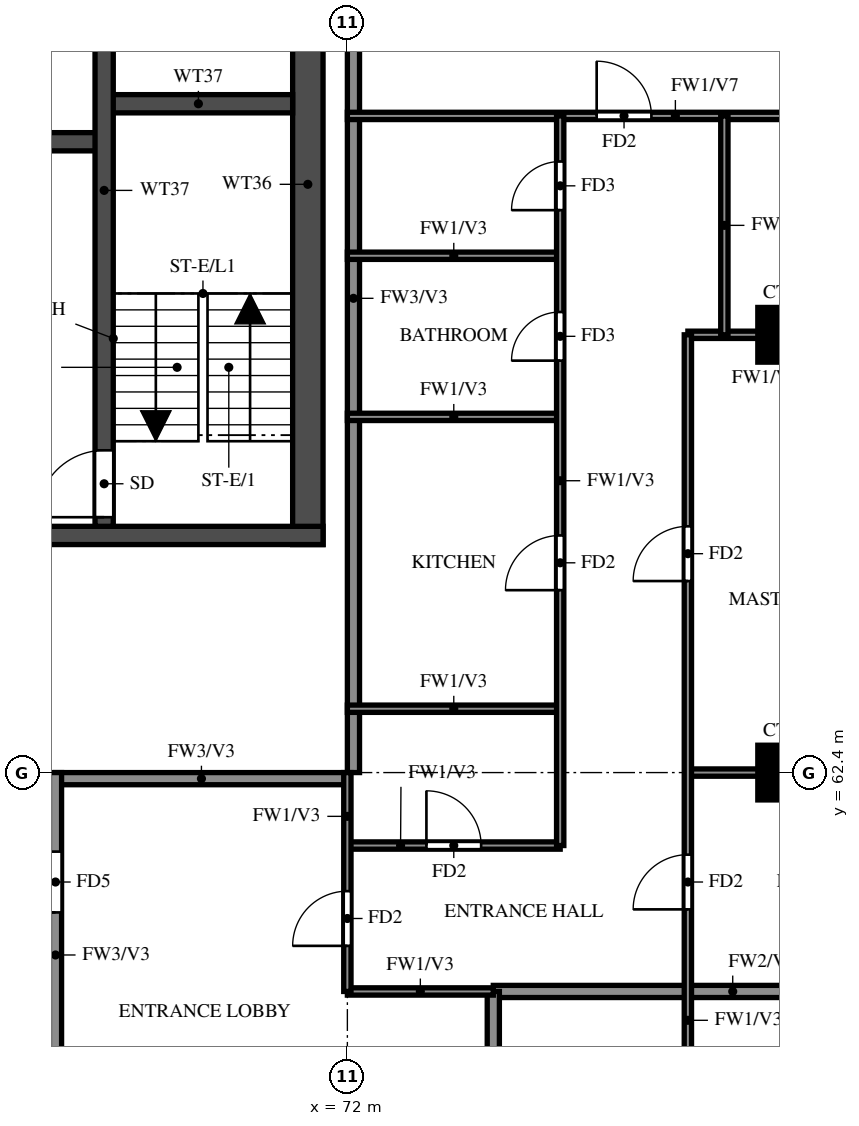
"""IFC4 building model, lengths in metres.
Left out: names, types, materials, properties, quantities, classifications, styles, units other than length and angle.
Written with IfcOpenShell. Run it as: python <this file> out.ifc"""

import sys

from ifc_helpers import new_model, si_unit, direction, frame, frame_2d, origin, origin_2d, place, context, subcontext, project, spatial, rectangle, extrude, source, transform, mapped, element, fill, save


model = new_model("IFC4")
c1 = context("Model", 3, precision=1e-05, world=origin(), true_north=direction((0.0, 1.0)))
c2 = subcontext(c1, "Body", "Model", "MODEL_VIEW")
j1 = project(units=[si_unit("LENGTHUNIT", "METRE"), si_unit("PLANEANGLEUNIT", "RADIAN")], contexts=[c1])
p1 = place(None, origin())
s1 = spatial("IfcSite", under=j1, at=p1, CompositionType="ELEMENT")
p2 = place(p1, origin())
s2 = spatial("IfcBuilding", under=s1, at=p2, CompositionType="ELEMENT")
p3 = place(p2, frame((0.0, 0.0, 218.5)))
s3 = spatial("IfcBuildingStorey", under=s2, at=p3, CompositionType="ELEMENT", Elevation=218.5)
m1 = source(origin(), c2, "Body", "SweptSolid", [
    extrude(rectangle(XDim=0.9, YDim=0.9, at=origin_2d()), origin(), (0.0, 0.0, 1.0), 3.22),
])
for number, where, z_axis, x_axis in (
    (1, (79.2, 62.4, 0.0), (0.0, 0.0, 1.0), (1.0, 0.0, 0.0)),
    (2, (79.2, 69.6, 0.0), (0.0, 0.0, 1.0), (1.0, 0.0, 0.0)),
):
    element("IfcColumn", number, at=place(p3, frame(where, z_axis=z_axis, x_axis=x_axis)), inside=s3, PredefinedType="COLUMN", context=c2, shape_type="MappedRepresentation", body=[
        mapped(m1, transform((0.0, 0.0, 0.0))),
    ])
p4 = place(p3, frame((71.35, 66.15, 0.0), z_axis=(0.0, 0.0, 1.0), x_axis=(0.0, 1.0, 0.0)))
e3 = element("IfcWall", 3, at=p4, inside=s3, PredefinedType="SHEAR", context=c2, shape_type="SweptSolid", body=[
    extrude(rectangle(XDim=11.85, YDim=0.5, at=frame_2d((5.925, 0.0))), origin(), (0.0, 0.0, 1.0), 3.22),
])
p5 = place(p3, frame((29.2, 66.3, 0.0), z_axis=(0.0, 0.0, 1.0), x_axis=(1.0, 0.0, 0.0)))
e4 = element("IfcWall", 4, at=p5, inside=s3, PredefinedType="SHEAR", context=c2, shape_type="SweptSolid", body=[
    extrude(rectangle(XDim=42.4, YDim=0.3, at=frame_2d((21.2, 0.0))), origin(), (0.0, 0.0, 1.0), 3.22),
])
p6 = place(p5, frame((1.425, 0.0, 0.0)))
e5 = element("IfcOpeningElement", 5, at=p6, cuts=e4, PredefinedType="OPENING", context=c2, shape_type="SweptSolid", body=[
    extrude(rectangle(XDim=1.1, YDim=2.1, at=frame_2d((0.55, 1.05))), frame((0.0, 0.16, 0.0), z_axis=(0.0, -1.0, 0.0), x_axis=(1.0, 0.0, 0.0)), (0.0, 0.0, 1.0), 0.32),
])
p7 = place(p5, frame((4.2, 0.0, 0.0)))
e6 = element("IfcOpeningElement", 6, at=p7, cuts=e4, PredefinedType="OPENING", context=c2, shape_type="SweptSolid", body=[
    extrude(rectangle(XDim=1.8, YDim=2.1, at=frame_2d((0.9, 1.05))), frame((0.0, 0.16, 0.0), z_axis=(0.0, -1.0, 0.0), x_axis=(1.0, 0.0, 0.0)), (0.0, 0.0, 1.0), 0.32),
])
p8 = place(p3, frame((32.8, 72.775, 0.0), z_axis=(0.0, 0.0, 1.0), x_axis=(1.0, 0.0, 0.0)))
e7 = element("IfcWall", 7, at=p8, inside=s3, PredefinedType="SHEAR", context=c2, shape_type="SweptSolid", body=[
    extrude(rectangle(XDim=35.2, YDim=0.3, at=frame_2d((17.6, 0.0))), origin(), (0.0, 0.0, 1.0), 3.22),
])
p9 = place(p8, frame((19.8, 0.0, 0.0)))
e8 = element("IfcOpeningElement", 8, at=p9, cuts=e7, PredefinedType="OPENING", context=c2, shape_type="SweptSolid", body=[
    extrude(rectangle(XDim=1.1, YDim=2.1, at=frame_2d((0.55, 1.05))), frame((0.0, 0.16, 0.0), z_axis=(0.0, -1.0, 0.0), x_axis=(1.0, 0.0, 0.0)), (0.0, 0.0, 1.0), 0.32),
])
p10 = place(p8, frame((27.725, 0.0, 0.0)))
e9 = element("IfcOpeningElement", 9, at=p10, cuts=e7, PredefinedType="OPENING", context=c2, shape_type="SweptSolid", body=[
    extrude(rectangle(XDim=1.1, YDim=2.1, at=frame_2d((0.55, 1.05))), frame((0.0, 0.16, 0.0), z_axis=(0.0, -1.0, 0.0), x_axis=(1.0, 0.0, 0.0)), (0.0, 0.0, 1.0), 0.32),
])
p11 = place(p8, frame((30.325, 0.0, 0.0)))
e10 = element("IfcOpeningElement", 10, at=p11, cuts=e7, PredefinedType="OPENING", context=c2, shape_type="SweptSolid", body=[
    extrude(rectangle(XDim=1.1, YDim=2.1, at=frame_2d((0.55, 1.05))), frame((0.0, 0.16, 0.0), z_axis=(0.0, -1.0, 0.0), x_axis=(1.0, 0.0, 0.0)), (0.0, 0.0, 1.0), 0.32),
])
p12 = place(p8, frame((3.825, 0.0, 0.0)))
e11 = element("IfcOpeningElement", 11, at=p12, cuts=e7, PredefinedType="OPENING", context=c2, shape_type="SweptSolid", body=[
    extrude(rectangle(XDim=1.1, YDim=2.1, at=frame_2d((0.55, 1.05))), frame((0.0, 0.16, 0.0), z_axis=(0.0, -1.0, 0.0), x_axis=(1.0, 0.0, 0.0)), (0.0, 0.0, 1.0), 0.32),
])
p13 = place(p8, frame((6.575, 0.0, 0.0)))
e12 = element("IfcOpeningElement", 12, at=p13, cuts=e7, PredefinedType="OPENING", context=c2, shape_type="SweptSolid", body=[
    extrude(rectangle(XDim=1.1, YDim=2.1, at=frame_2d((0.55, 1.05))), frame((0.0, 0.16, 0.0), z_axis=(0.0, -1.0, 0.0), x_axis=(1.0, 0.0, 0.0)), (0.0, 0.0, 1.0), 0.32),
])
p14 = place(p8, frame((9.325, 0.0, 0.0)))
e13 = element("IfcOpeningElement", 13, at=p14, cuts=e7, PredefinedType="OPENING", context=c2, shape_type="SweptSolid", body=[
    extrude(rectangle(XDim=1.1, YDim=2.1, at=frame_2d((0.55, 1.05))), frame((0.0, 0.16, 0.0), z_axis=(0.0, -1.0, 0.0), x_axis=(1.0, 0.0, 0.0)), (0.0, 0.0, 1.0), 0.32),
])
p15 = place(p8, frame((12.075, 0.0, 0.0)))
e14 = element("IfcOpeningElement", 14, at=p15, cuts=e7, PredefinedType="OPENING", context=c2, shape_type="SweptSolid", body=[
    extrude(rectangle(XDim=1.1, YDim=2.1, at=frame_2d((0.55, 1.05))), frame((0.0, 0.16, 0.0), z_axis=(0.0, -1.0, 0.0), x_axis=(1.0, 0.0, 0.0)), (0.0, 0.0, 1.0), 0.32),
])
p16 = place(p8, frame((14.825, 0.0, 0.0)))
e15 = element("IfcOpeningElement", 15, at=p16, cuts=e7, PredefinedType="OPENING", context=c2, shape_type="SweptSolid", body=[
    extrude(rectangle(XDim=1.1, YDim=2.1, at=frame_2d((0.55, 1.05))), frame((0.0, 0.16, 0.0), z_axis=(0.0, -1.0, 0.0), x_axis=(1.0, 0.0, 0.0)), (0.0, 0.0, 1.0), 0.32),
])
p17 = place(p8, frame((17.575, 0.0, 0.0)))
e16 = element("IfcOpeningElement", 16, at=p17, cuts=e7, PredefinedType="OPENING", context=c2, shape_type="SweptSolid", body=[
    extrude(rectangle(XDim=1.1, YDim=2.1, at=frame_2d((0.55, 1.05))), frame((0.0, 0.16, 0.0), z_axis=(0.0, -1.0, 0.0), x_axis=(1.0, 0.0, 0.0)), (0.0, 0.0, 1.0), 0.32),
])
p18 = place(p8, frame((0.95, 0.0, 0.0)))
e17 = element("IfcOpeningElement", 17, at=p18, cuts=e7, PredefinedType="OPENING", context=c2, shape_type="SweptSolid", body=[
    extrude(rectangle(XDim=1.1, YDim=2.1, at=frame_2d((0.55, 1.05))), frame((0.0, 0.16, 0.0), z_axis=(0.0, -1.0, 0.0), x_axis=(1.0, 0.0, 0.0)), (0.0, 0.0, 1.0), 0.32),
])
p19 = place(p3, frame((68.0, 73.4, 0.0), z_axis=(0.0, 0.0, 1.0), x_axis=(1.0, 0.0, 0.0)))
e18 = element("IfcWall", 18, at=p19, inside=s3, PredefinedType="SHEAR", context=c2, shape_type="SweptSolid", body=[
    extrude(rectangle(XDim=3.1, YDim=0.3, at=frame_2d((1.55, 0.0))), origin(), (0.0, 0.0, 1.0), 3.22),
])
p20 = place(p3, frame((68.0, 66.45, 0.0), z_axis=(0.0, 0.0, 1.0), x_axis=(0.0, 1.0, 0.0)))
e19 = element("IfcWall", 19, at=p20, inside=s3, PredefinedType="SHEAR", context=c2, shape_type="SweptSolid", body=[
    extrude(rectangle(XDim=11.05, YDim=0.3, at=frame_2d((5.525, 0.0))), origin(), (0.0, 0.0, 1.0), 3.22),
])
p21 = place(p20, frame((0.15, 0.0, 0.0)))
e20 = element("IfcOpeningElement", 20, at=p21, cuts=e19, PredefinedType="OPENING", context=c2, shape_type="SweptSolid", body=[
    extrude(rectangle(XDim=1.1, YDim=2.1, at=frame_2d((0.55, 1.05))), frame((0.0, 0.16, 0.0), z_axis=(0.0, -1.0, 0.0), x_axis=(1.0, 0.0, 0.0)), (0.0, 0.0, 1.0), 0.32),
])
p22 = place(p3, frame((67.2, 62.3, 0.0), z_axis=(0.0, 0.0, 1.0), x_axis=(1.0, 0.0, 0.0)))
e21 = element("IfcWall", 21, at=p22, inside=s3, PredefinedType="SOLIDWALL", context=c2, shape_type="SweptSolid", body=[
    extrude(rectangle(XDim=4.8, YDim=0.2, at=frame_2d((2.4, 0.0))), origin(), (0.0, 0.0, 1.0), 3.22),
])
p23 = place(p3, frame((67.2, 56.4, 0.0), z_axis=(0.0, 0.0, 1.0), x_axis=(0.0, 1.0, 0.0)))
e22 = element("IfcWall", 22, at=p23, inside=s3, PredefinedType="SOLIDWALL", context=c2, shape_type="SweptSolid", body=[
    extrude(rectangle(XDim=6.0, YDim=0.2, at=frame_2d((3.0, 0.0))), origin(), (0.0, 0.0, 1.0), 3.22),
])
p24 = place(p23, frame((3.7, 0.0, 0.0)))
e23 = element("IfcOpeningElement", 23, at=p24, cuts=e22, PredefinedType="OPENING", context=c2, shape_type="SweptSolid", body=[
    extrude(rectangle(XDim=1.0, YDim=2.1, at=frame_2d((0.5, 1.05))), frame((0.0, 0.11, 0.0), z_axis=(0.0, -1.0, 0.0), x_axis=(1.0, 0.0, 0.0)), (0.0, 0.0, 1.0), 0.22),
])
p25 = place(p3, frame((72.1, 62.4, 0.0), z_axis=(0.0, 0.0, 1.0), x_axis=(0.0, 1.0, 0.0)))
e24 = element("IfcWall", 24, at=p25, inside=s3, PredefinedType="SOLIDWALL", context=c2, shape_type="SweptSolid", body=[
    extrude(rectangle(XDim=15.6, YDim=0.2, at=frame_2d((7.8, 0.0))), origin(), (0.0, 0.0, 1.0), 3.22),
])
p26 = place(p3, frame((74.4, 58.8, 0.0), z_axis=(0.0, 0.0, 1.0), x_axis=(1.0, 0.0, 0.0)))
e25 = element("IfcWall", 25, at=p26, inside=s3, PredefinedType="SOLIDWALL", context=c2, shape_type="SweptSolid", body=[
    extrude(rectangle(XDim=7.875, YDim=0.2, at=frame_2d((3.938, 0.0))), origin(), (0.0, 0.0, 1.0), 2.32),
])
p27 = place(p3, frame((74.4, 56.4, 0.0), z_axis=(0.0, 0.0, 1.0), x_axis=(0.0, 1.0, 0.0)))
e26 = element("IfcWall", 26, at=p27, inside=s3, PredefinedType="SOLIDWALL", context=c2, shape_type="SweptSolid", body=[
    extrude(rectangle(XDim=2.4, YDim=0.2, at=frame_2d((1.2, 0.0))), origin(), (0.0, 0.0, 1.0), 3.22),
])
p28 = place(p3, frame((72.0, 58.8, 0.0), z_axis=(0.0, 0.0, 1.0), x_axis=(1.0, 0.0, 0.0)))
e27 = element("IfcWall", 27, at=p28, inside=s3, PredefinedType="PARTITIONING", context=c2, shape_type="SweptSolid", body=[
    extrude(rectangle(XDim=2.4, YDim=0.12, at=frame_2d((1.2, 0.0))), origin(), (0.0, 0.0, 1.0), 3.22),
])
p29 = place(p3, frame((72.0, 61.2, 0.0), z_axis=(0.0, 0.0, 1.0), x_axis=(1.0, 0.0, 0.0)))
e28 = element("IfcWall", 28, at=p29, inside=s3, PredefinedType="PARTITIONING", context=c2, shape_type="SweptSolid", body=[
    extrude(rectangle(XDim=3.5, YDim=0.12, at=frame_2d((1.75, 0.0))), origin(), (0.0, 0.0, 1.0), 3.22),
])
p30 = place(p29, frame((1.3, 0.0, 0.0)))
e29 = element("IfcOpeningElement", 29, at=p30, cuts=e28, PredefinedType="OPENING", context=c2, shape_type="SweptSolid", body=[
    extrude(rectangle(XDim=0.9, YDim=2.1, at=frame_2d((0.45, 1.05))), frame((0.0, 0.07, 0.0), z_axis=(0.0, -1.0, 0.0), x_axis=(1.0, 0.0, 0.0)), (0.0, 0.0, 1.0), 0.14),
])
p31 = place(p3, frame((77.6, 62.4, 0.0), z_axis=(0.0, 0.0, 1.0), x_axis=(1.0, 0.0, 0.0)))
e30 = element("IfcWall", 30, at=p31, inside=s3, PredefinedType="PARTITIONING", context=c2, shape_type="SweptSolid", body=[
    extrude(rectangle(XDim=4.675, YDim=0.12, at=frame_2d((2.337, 0.0))), origin(), (0.0, 0.0, 1.0), 3.22),
])
for number, where, z_axis, x_axis in (
    (31, (72.0, 63.45, 0.0), (0.0, 0.0, 1.0), (1.0, 0.0, 0.0)),
    (32, (72.0, 68.25, 0.0), (0.0, 0.0, 1.0), (1.0, 0.0, 0.0)),
):
    element("IfcWall", number, at=place(p3, frame(where, z_axis=z_axis, x_axis=x_axis)), inside=s3, PredefinedType="PARTITIONING", context=c2, shape_type="SweptSolid", body=[
        extrude(rectangle(XDim=3.5, YDim=0.12, at=frame_2d((1.75, 0.0))), origin(), (0.0, 0.0, 1.0), 3.22),
    ])
p32 = place(p3, frame((77.6, 69.6, 0.0), z_axis=(0.0, 0.0, 1.0), x_axis=(1.0, 0.0, 0.0)))
e33 = element("IfcWall", 33, at=p32, inside=s3, PredefinedType="PARTITIONING", context=c2, shape_type="SweptSolid", body=[
    extrude(rectangle(XDim=4.675, YDim=0.12, at=frame_2d((2.337, 0.0))), origin(), (0.0, 0.0, 1.0), 3.22),
])
p33 = place(p32, frame((2.337, 0.0, 0.0)))
e34 = element("IfcOpeningElement", 34, at=p33, cuts=e33, PredefinedType="OPENING", context=c2, shape_type="SweptSolid", body=[
    extrude(rectangle(XDim=0.8, YDim=2.1, at=frame_2d((0.4, 1.05))), frame((0.0, 0.07, 0.0), z_axis=(0.0, -1.0, 0.0), x_axis=(1.0, 0.0, 0.0)), (0.0, 0.0, 1.0), 0.14),
])
p34 = place(p3, frame((72.0, 70.9, 0.0), z_axis=(0.0, 0.0, 1.0), x_axis=(1.0, 0.0, 0.0)))
e35 = element("IfcWall", 35, at=p34, inside=s3, PredefinedType="PARTITIONING", context=c2, shape_type="SweptSolid", body=[
    extrude(rectangle(XDim=3.5, YDim=0.12, at=frame_2d((1.75, 0.0))), origin(), (0.0, 0.0, 1.0), 3.22),
])
p35 = place(p3, frame((72.0, 73.2, 0.0), z_axis=(0.0, 0.0, 1.0), x_axis=(1.0, 0.0, 0.0)))
e36 = element("IfcWall", 36, at=p35, inside=s3, PredefinedType="PARTITIONING", context=c2, shape_type="SweptSolid", body=[
    extrude(rectangle(XDim=10.275, YDim=0.12, at=frame_2d((5.137, 0.0))), origin(), (0.0, 0.0, 1.0), 2.32),
])
p36 = place(p35, frame((4.1, 0.0, 0.0)))
e37 = element("IfcOpeningElement", 37, at=p36, cuts=e36, PredefinedType="OPENING", context=c2, shape_type="SweptSolid", body=[
    extrude(rectangle(XDim=0.9, YDim=2.1, at=frame_2d((0.45, 1.05))), frame((0.0, 0.07, 0.0), z_axis=(0.0, -1.0, 0.0), x_axis=(1.0, 0.0, 0.0)), (0.0, 0.0, 1.0), 0.14),
])
p37 = place(p3, frame((72.0, 58.8, 0.0), z_axis=(0.0, 0.0, 1.0), x_axis=(0.0, 1.0, 0.0)))
e38 = element("IfcWall", 38, at=p37, inside=s3, PredefinedType="PARTITIONING", context=c2, shape_type="SweptSolid", body=[
    extrude(rectangle(XDim=3.6, YDim=0.12, at=frame_2d((1.8, 0.0))), origin(), (0.0, 0.0, 1.0), 3.22),
])
p38 = place(p37, frame((0.75, 0.0, 0.0)))
e39 = element("IfcOpeningElement", 39, at=p38, cuts=e38, PredefinedType="OPENING", context=c2, shape_type="SweptSolid", body=[
    extrude(rectangle(XDim=0.9, YDim=2.1, at=frame_2d((0.45, 1.05))), frame((0.0, 0.07, 0.0), z_axis=(0.0, -1.0, 0.0), x_axis=(1.0, 0.0, 0.0)), (0.0, 0.0, 1.0), 0.14),
])
p39 = place(p3, frame((75.5, 61.2, 0.0), z_axis=(0.0, 0.0, 1.0), x_axis=(0.0, 1.0, 0.0)))
e40 = element("IfcWall", 40, at=p39, inside=s3, PredefinedType="PARTITIONING", context=c2, shape_type="SweptSolid", body=[
    extrude(rectangle(XDim=12.0, YDim=0.12, at=frame_2d((6.0, 0.0))), origin(), (0.0, 0.0, 1.0), 3.22),
])
p40 = place(p39, frame((4.2, 0.0, 0.0)))
e41 = element("IfcOpeningElement", 41, at=p40, cuts=e40, PredefinedType="OPENING", context=c2, shape_type="SweptSolid", body=[
    extrude(rectangle(XDim=0.9, YDim=2.1, at=frame_2d((0.45, 1.05))), frame((0.0, 0.07, 0.0), z_axis=(0.0, -1.0, 0.0), x_axis=(1.0, 0.0, 0.0)), (0.0, 0.0, 1.0), 0.14),
])
p41 = place(p39, frame((7.975, 0.0, 0.0)))
e42 = element("IfcOpeningElement", 42, at=p41, cuts=e40, PredefinedType="OPENING", context=c2, shape_type="SweptSolid", body=[
    extrude(rectangle(XDim=0.8, YDim=2.1, at=frame_2d((0.4, 1.05))), frame((0.0, 0.07, 0.0), z_axis=(0.0, -1.0, 0.0), x_axis=(1.0, 0.0, 0.0)), (0.0, 0.0, 1.0), 0.14),
])
p42 = place(p39, frame((10.45, 0.0, 0.0)))
e43 = element("IfcOpeningElement", 43, at=p42, cuts=e40, PredefinedType="OPENING", context=c2, shape_type="SweptSolid", body=[
    extrude(rectangle(XDim=0.8, YDim=2.1, at=frame_2d((0.4, 1.05))), frame((0.0, 0.07, 0.0), z_axis=(0.0, -1.0, 0.0), x_axis=(1.0, 0.0, 0.0)), (0.0, 0.0, 1.0), 0.14),
])
p43 = place(p3, frame((77.6, 48.125, 0.0), z_axis=(0.0, 0.0, 1.0), x_axis=(0.0, 1.0, 0.0)))
e44 = element("IfcWall", 44, at=p43, inside=s3, PredefinedType="PARTITIONING", context=c2, shape_type="SweptSolid", body=[
    extrude(rectangle(XDim=21.475, YDim=0.12, at=frame_2d((10.738, 0.0))), origin(), (0.0, 0.0, 1.0), 3.22),
])
p44 = place(p43, frame((1.288, 0.0, 0.0)))
e45 = element("IfcOpeningElement", 45, at=p44, cuts=e44, PredefinedType="OPENING", context=c2, shape_type="SweptSolid", body=[
    extrude(rectangle(XDim=0.9, YDim=2.1, at=frame_2d((0.45, 1.05))), frame((0.0, 0.07, 0.0), z_axis=(0.0, -1.0, 0.0), x_axis=(1.0, 0.0, 0.0)), (0.0, 0.0, 1.0), 0.14),
])
p45 = place(p43, frame((7.825, 0.0, 0.0)))
e46 = element("IfcOpeningElement", 46, at=p45, cuts=e44, PredefinedType="OPENING", context=c2, shape_type="SweptSolid", body=[
    extrude(rectangle(XDim=1.5, YDim=2.1, at=frame_2d((0.75, 1.05))), frame((0.0, 0.07, 0.0), z_axis=(0.0, -1.0, 0.0), x_axis=(1.0, 0.0, 0.0)), (0.0, 0.0, 1.0), 0.14),
])
p46 = place(p43, frame((12.025, 0.0, 0.0)))
e47 = element("IfcOpeningElement", 47, at=p46, cuts=e44, PredefinedType="OPENING", context=c2, shape_type="SweptSolid", body=[
    extrude(rectangle(XDim=0.9, YDim=2.1, at=frame_2d((0.45, 1.05))), frame((0.0, 0.07, 0.0), z_axis=(0.0, -1.0, 0.0), x_axis=(1.0, 0.0, 0.0)), (0.0, 0.0, 1.0), 0.14),
])
p47 = place(p43, frame((17.425, 0.0, 0.0)))
e48 = element("IfcOpeningElement", 48, at=p47, cuts=e44, PredefinedType="OPENING", context=c2, shape_type="SweptSolid", body=[
    extrude(rectangle(XDim=0.9, YDim=2.1, at=frame_2d((0.45, 1.05))), frame((0.0, 0.07, 0.0), z_axis=(0.0, -1.0, 0.0), x_axis=(1.0, 0.0, 0.0)), (0.0, 0.0, 1.0), 0.14),
])
p48 = place(p3, frame((78.2, 69.6, 0.0), z_axis=(0.0, 0.0, 1.0), x_axis=(0.0, 1.0, 0.0)))
e49 = element("IfcWall", 49, at=p48, inside=s3, PredefinedType="PARTITIONING", context=c2, shape_type="SweptSolid", body=[
    extrude(rectangle(XDim=3.6, YDim=0.12, at=frame_2d((1.8, 0.0))), origin(), (0.0, 0.0, 1.0), 3.22),
])
p49 = place(p21, origin())
e50 = element("IfcDoor", 50, at=p49, inside=s3, OperationType="SINGLE_SWING_RIGHT", PredefinedType="DOOR", context=c2, shape_type="SweptSolid", body=[
    extrude(rectangle(XDim=1.1, YDim=2.1, at=frame_2d((0.55, 1.05))), frame((0.0, 0.025, 0.0), z_axis=(0.0, -1.0, 0.0), x_axis=(1.0, 0.0, 0.0)), (0.0, 0.0, 1.0), 0.05),
])
fill(e20, e50)
p50 = place(p38, origin())
e51 = element("IfcDoor", 51, at=p50, inside=s3, OperationType="SINGLE_SWING_RIGHT", PredefinedType="DOOR", context=c2, shape_type="SweptSolid", body=[
    extrude(rectangle(XDim=0.9, YDim=2.1, at=frame_2d((0.45, 1.05))), frame((0.0, 0.025, 0.0), z_axis=(0.0, -1.0, 0.0), x_axis=(1.0, 0.0, 0.0)), (0.0, 0.0, 1.0), 0.05),
])
fill(e39, e51)
p51 = place(p24, origin())
e52 = element("IfcDoor", 52, at=p51, inside=s3, OperationType="SINGLE_SWING_LEFT", PredefinedType="DOOR", context=c2, shape_type="SweptSolid", body=[
    extrude(rectangle(XDim=1.0, YDim=2.1, at=frame_2d((0.5, 1.05))), frame((0.0, 0.025, 0.0), z_axis=(0.0, -1.0, 0.0), x_axis=(1.0, 0.0, 0.0)), (0.0, 0.0, 1.0), 0.05),
])
fill(e23, e52)
p52 = place(p46, origin())
e53 = element("IfcDoor", 53, at=p52, inside=s3, OperationType="SINGLE_SWING_LEFT", PredefinedType="DOOR", context=c2, shape_type="SweptSolid", body=[
    extrude(rectangle(XDim=0.9, YDim=2.1, at=frame_2d((0.45, 1.05))), frame((0.0, 0.025, 0.0), z_axis=(0.0, -1.0, 0.0), x_axis=(1.0, 0.0, 0.0)), (0.0, 0.0, 1.0), 0.05),
])
fill(e47, e53)
p53 = place(p47, origin())
e54 = element("IfcDoor", 54, at=p53, inside=s3, OperationType="SINGLE_SWING_RIGHT", PredefinedType="DOOR", context=c2, shape_type="SweptSolid", body=[
    extrude(rectangle(XDim=0.9, YDim=2.1, at=frame_2d((0.45, 1.05))), frame((0.0, 0.025, 0.0), z_axis=(0.0, -1.0, 0.0), x_axis=(1.0, 0.0, 0.0)), (0.0, 0.0, 1.0), 0.05),
])
fill(e48, e54)
p54 = place(p36, origin())
e55 = element("IfcDoor", 55, at=p54, inside=s3, OperationType="SINGLE_SWING_LEFT", PredefinedType="DOOR", context=c2, shape_type="SweptSolid", body=[
    extrude(rectangle(XDim=0.9, YDim=2.1, at=frame_2d((0.45, 1.05))), frame((0.0, 0.025, 0.0), z_axis=(0.0, -1.0, 0.0), x_axis=(1.0, 0.0, 0.0)), (0.0, 0.0, 1.0), 0.05),
])
fill(e37, e55)
p55 = place(p30, origin())
e56 = element("IfcDoor", 56, at=p55, inside=s3, OperationType="SINGLE_SWING_RIGHT", PredefinedType="DOOR", context=c2, shape_type="SweptSolid", body=[
    extrude(rectangle(XDim=0.9, YDim=2.1, at=frame_2d((0.45, 1.05))), frame((0.0, 0.025, 0.0), z_axis=(0.0, -1.0, 0.0), x_axis=(1.0, 0.0, 0.0)), (0.0, 0.0, 1.0), 0.05),
])
fill(e29, e56)
p56 = place(p40, origin())
e57 = element("IfcDoor", 57, at=p56, inside=s3, OperationType="SINGLE_SWING_LEFT", PredefinedType="DOOR", context=c2, shape_type="SweptSolid", body=[
    extrude(rectangle(XDim=0.9, YDim=2.1, at=frame_2d((0.45, 1.05))), frame((0.0, 0.025, 0.0), z_axis=(0.0, -1.0, 0.0), x_axis=(1.0, 0.0, 0.0)), (0.0, 0.0, 1.0), 0.05),
])
fill(e41, e57)
p57 = place(p41, origin())
e58 = element("IfcDoor", 58, at=p57, inside=s3, OperationType="SINGLE_SWING_LEFT", PredefinedType="DOOR", context=c2, shape_type="SweptSolid", body=[
    extrude(rectangle(XDim=0.8, YDim=2.1, at=frame_2d((0.4, 1.05))), frame((0.0, 0.025, 0.0), z_axis=(0.0, -1.0, 0.0), x_axis=(1.0, 0.0, 0.0)), (0.0, 0.0, 1.0), 0.05),
])
fill(e42, e58)
p58 = place(p42, origin())
e59 = element("IfcDoor", 59, at=p58, inside=s3, OperationType="SINGLE_SWING_RIGHT", PredefinedType="DOOR", context=c2, shape_type="SweptSolid", body=[
    extrude(rectangle(XDim=0.8, YDim=2.1, at=frame_2d((0.4, 1.05))), frame((0.0, 0.025, 0.0), z_axis=(0.0, -1.0, 0.0), x_axis=(1.0, 0.0, 0.0)), (0.0, 0.0, 1.0), 0.05),
])
fill(e43, e59)
save(model, sys.argv[1])
